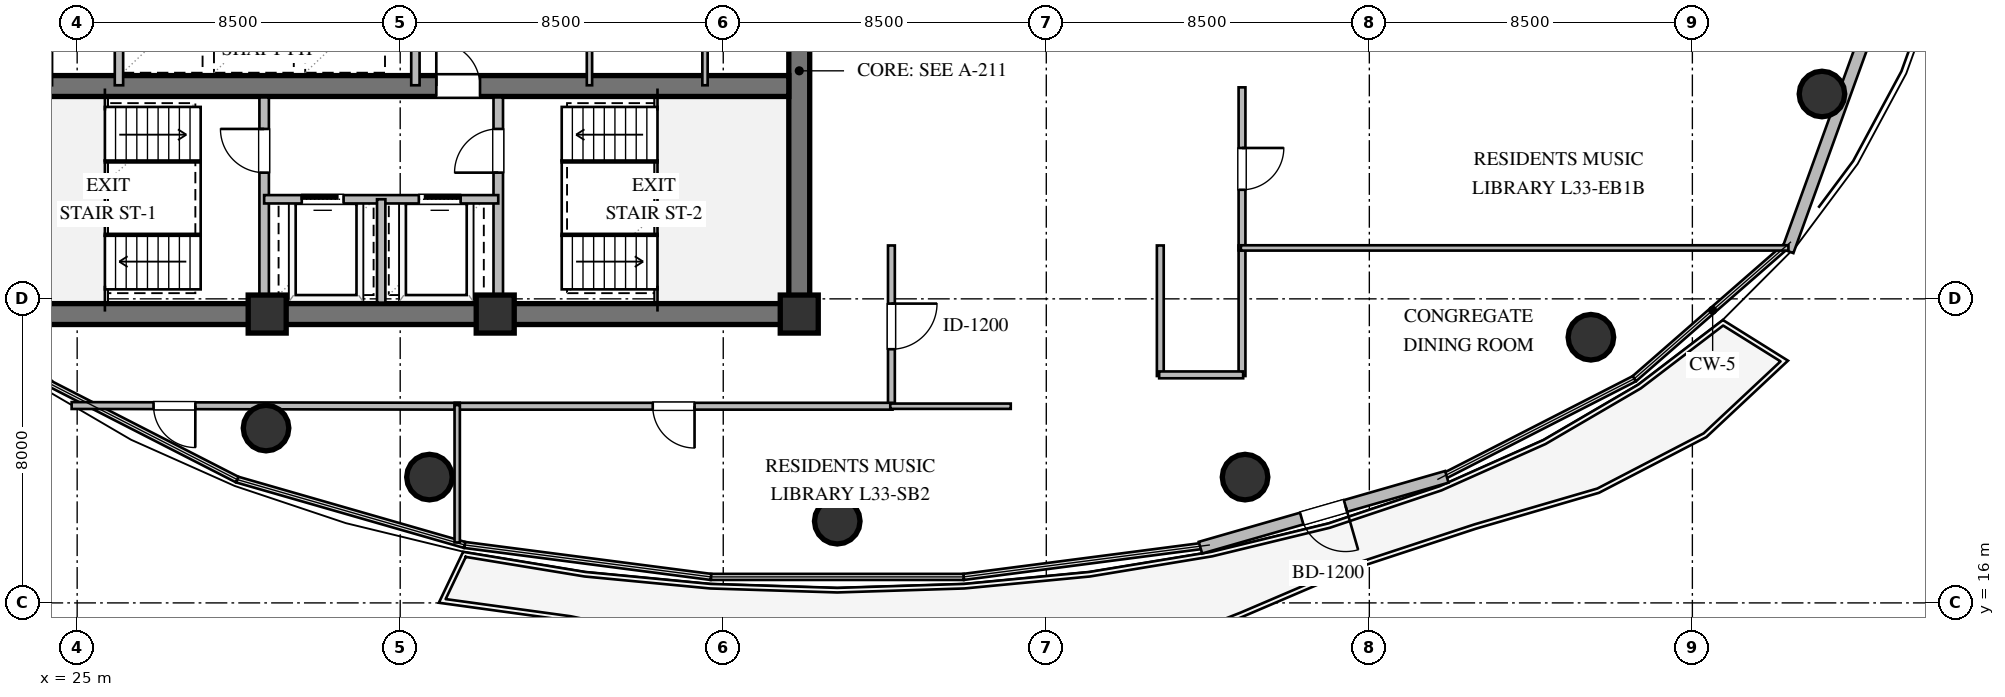
"""IFC4 building model, lengths in metres.
Left out: names, types, materials, properties, quantities, classifications, styles, units other than length and angle.
Written with IfcOpenShell. Run it as: python <this file> out.ifc"""

import sys

from ifc_helpers import new_model, si_unit, direction, frame, frame_2d, origin, origin_2d, place, context, subcontext, project, spatial, rectangle, circle, extrude, element, fill, save


model = new_model("IFC4")
c1 = context("Model", 3, precision=1e-05, world=origin(), true_north=direction((0.0, 1.0)))
c2 = subcontext(c1, "Body", "Model", "MODEL_VIEW")
j1 = project(units=[si_unit("LENGTHUNIT", "METRE"), si_unit("PLANEANGLEUNIT", "RADIAN")], contexts=[c1])
p1 = place(None, origin())
s1 = spatial("IfcSite", under=j1, at=p1, CompositionType="ELEMENT")
p2 = place(p1, origin())
s2 = spatial("IfcBuilding", under=s1, at=p2, CompositionType="ELEMENT")
p3 = place(p2, frame((0.0, 0.0, 127.8)))
s3 = spatial("IfcBuildingStorey", under=s2, at=p3, CompositionType="ELEMENT", Elevation=127.8)
p4 = place(p3, frame((21.725, 23.6, 0.0), z_axis=(0.0, 0.0, 1.0), x_axis=(1.0, 0.0, 0.0)))
e1 = element("IfcWall", 1, at=p4, inside=s3, PredefinedType="SHEAR", context=c2, shape_type="SweptSolid", body=[
    extrude(rectangle(XDim=22.55, YDim=0.55, at=frame_2d((11.275, 0.0))), origin(), (0.0, 0.0, 1.0), 3.36),
])
p5 = place(p3, frame((44.0, 23.875, 0.0), z_axis=(0.0, 0.0, 1.0), x_axis=(0.0, 1.0, 0.0)))
e2 = element("IfcWall", 2, at=p5, inside=s3, PredefinedType="SHEAR", context=c2, shape_type="SweptSolid", body=[
    extrude(rectangle(XDim=12.25, YDim=0.55, at=frame_2d((6.125, 0.0))), origin(), (0.0, 0.0, 1.0), 3.36),
])
p6 = place(p5, frame((8.725, 0.0, 0.0)))
e3 = element("IfcOpeningElement", 3, at=p6, cuts=e2, PredefinedType="OPENING", context=c2, shape_type="SweptSolid", body=[
    extrude(rectangle(XDim=1.5, YDim=2.15, at=frame_2d((0.75, 1.075))), frame((0.0, 0.285, 0.0), z_axis=(0.0, -1.0, 0.0), x_axis=(1.0, 0.0, 0.0)), (0.0, 0.0, 1.0), 0.57),
])
p7 = place(p3, frame((22.275, 29.6, 0.0), z_axis=(0.0, 0.0, 1.0), x_axis=(1.0, 0.0, 0.0)))
e4 = element("IfcWall", 4, at=p7, inside=s3, PredefinedType="SHEAR", context=c2, shape_type="SweptSolid", body=[
    extrude(rectangle(XDim=21.45, YDim=0.55, at=frame_2d((10.725, 0.0))), origin(), (0.0, 0.0, 1.0), 3.36),
])
p8 = place(p7, frame((12.175, 0.0, 0.0)))
e5 = element("IfcOpeningElement", 5, at=p8, cuts=e4, PredefinedType="OPENING", context=c2, shape_type="SweptSolid", body=[
    extrude(rectangle(XDim=1.15, YDim=2.1, at=frame_2d((0.575, 1.05))), frame((0.0, 0.285, 0.0), z_axis=(0.0, -1.0, 0.0), x_axis=(1.0, 0.0, 0.0)), (0.0, 0.0, 1.0), 0.57),
])
for number, where, z_axis, x_axis in (
    (6, (30.0, 23.6, 0.0), (0.0, 0.0, 1.0), (1.0, 0.0, 0.0)),
    (7, (36.0, 23.6, 0.0), (0.0, 0.0, 1.0), (1.0, 0.0, 0.0)),
    (8, (44.0, 23.6, 0.0), (0.0, 0.0, 1.0), (1.0, 0.0, 0.0)),
):
    element("IfcColumn", number, at=place(p3, frame(where, z_axis=z_axis, x_axis=x_axis)), inside=s3, PredefinedType="COLUMN", context=c2, shape_type="SweptSolid", body=[
        extrude(rectangle(XDim=1.0, YDim=1.0, at=origin_2d()), origin(), (0.0, 0.0, 1.0), 3.6),
    ])
for number, where, z_axis, x_axis in (
    (9, (29.97, 20.6, 0.0), (0.0, 0.0, 1.0), (1.0, 0.0, 0.0)),
    (10, (34.27, 19.31, 0.0), (0.0, 0.0, 1.0), (1.0, 0.0, 0.0)),
    (11, (45.0, 18.15, 0.0), (0.0, 0.0, 1.0), (1.0, 0.0, 0.0)),
    (12, (55.73, 19.31, 0.0), (0.0, 0.0, 1.0), (1.0, 0.0, 0.0)),
    (13, (64.83, 22.99, 0.0), (0.0, 0.0, 1.0), (1.0, 0.0, 0.0)),
    (14, (70.91, 29.39, 0.0), (0.0, 0.0, 1.0), (1.0, 0.0, 0.0)),
):
    element("IfcColumn", number, at=place(p3, frame(where, z_axis=z_axis, x_axis=x_axis)), inside=s3, PredefinedType="COLUMN", context=c2, shape_type="SweptSolid", body=[
        extrude(circle(Radius=0.6, at=origin_2d()), origin(), (0.0, 0.0, 1.0), 3.6),
    ])
p9 = place(p3, frame((74.708, 38.244, 0.0), z_axis=(0.0, 0.0, 1.0), x_axis=(-0.340324669139, -0.94030799187, 0.0)))
e15 = element("IfcWall", 15, at=p9, inside=s3, PredefinedType="STANDARD", context=c2, shape_type="SweptSolid", body=[
    extrude(rectangle(XDim=13.81, YDim=0.32, at=frame_2d((6.905, 0.0))), origin(), (0.0, 0.0, 1.0), 3.36),
])
p10 = place(p3, frame((61.039, 19.317, 0.0), z_axis=(0.0, 0.0, 1.0), x_axis=(-0.96106509915, -0.276322049784, 0.0)))
e16 = element("IfcWall", 16, at=p10, inside=s3, PredefinedType="STANDARD", context=c2, shape_type="SweptSolid", body=[
    extrude(rectangle(XDim=6.746, YDim=0.32, at=frame_2d((3.373, 0.0))), origin(), (0.0, 0.0, 1.0), 3.36),
])
p11 = place(p10, frame((2.773, 0.0, 0.0)))
e17 = element("IfcOpeningElement", 17, at=p11, cuts=e16, PredefinedType="OPENING", context=c2, shape_type="SweptSolid", body=[
    extrude(rectangle(XDim=1.2, YDim=2.15, at=frame_2d((0.6, 1.075))), frame((0.0, 0.17, 0.0), z_axis=(0.0, -1.0, 0.0), x_axis=(1.0, 0.0, 0.0)), (0.0, 0.0, 1.0), 0.34),
])
p12 = place(p3, frame((29.92, 23.9, 0.0), z_axis=(0.0, 0.0, 1.0), x_axis=(0.0, 1.0, 0.0)))
e18 = element("IfcWall", 18, at=p12, inside=s3, PredefinedType="SOLIDWALL", context=c2, shape_type="SweptSolid", body=[
    extrude(rectangle(XDim=5.4, YDim=0.25, at=frame_2d((2.7, 0.0))), origin(), (0.0, 0.0, 1.0), 2.89),
])
p13 = place(p12, frame((3.421, 0.0, 0.0)))
e19 = element("IfcOpeningElement", 19, at=p13, cuts=e18, PredefinedType="OPENING", context=c2, shape_type="SweptSolid", body=[
    extrude(rectangle(XDim=1.15, YDim=2.1, at=frame_2d((0.575, 1.05))), frame((0.0, 0.135, 0.0), z_axis=(0.0, -1.0, 0.0), x_axis=(1.0, 0.0, 0.0)), (0.0, 0.0, 1.0), 0.27),
])
p14 = place(p3, frame((36.08, 23.9, 0.0), z_axis=(0.0, 0.0, 1.0), x_axis=(0.0, 1.0, 0.0)))
e20 = element("IfcWall", 20, at=p14, inside=s3, PredefinedType="SOLIDWALL", context=c2, shape_type="SweptSolid", body=[
    extrude(rectangle(XDim=5.4, YDim=0.25, at=frame_2d((2.7, 0.0))), origin(), (0.0, 0.0, 1.0), 3.36),
])
p15 = place(p14, frame((3.421, 0.0, 0.0)))
e21 = element("IfcOpeningElement", 21, at=p15, cuts=e20, PredefinedType="OPENING", context=c2, shape_type="SweptSolid", body=[
    extrude(rectangle(XDim=1.15, YDim=2.1, at=frame_2d((0.575, 1.05))), frame((0.0, 0.135, 0.0), z_axis=(0.0, -1.0, 0.0), x_axis=(1.0, 0.0, 0.0)), (0.0, 0.0, 1.0), 0.27),
])
p16 = place(p3, frame((29.92, 26.62, 0.0), z_axis=(0.0, 0.0, 1.0), x_axis=(1.0, 0.0, 0.0)))
e22 = element("IfcWall", 22, at=p16, inside=s3, PredefinedType="SOLIDWALL", context=c2, shape_type="SweptSolid", body=[
    extrude(rectangle(XDim=6.16, YDim=0.22, at=frame_2d((3.08, 0.0))), origin(), (0.0, 0.0, 1.0), 3.36),
])
p17 = place(p16, frame((0.99, 0.0, 0.0)))
e23 = element("IfcOpeningElement", 23, at=p17, cuts=e22, PredefinedType="OPENING", context=c2, shape_type="SweptSolid", body=[
    extrude(rectangle(XDim=1.1, YDim=2.1, at=frame_2d((0.55, 1.05))), frame((0.0, 0.12, 0.0), z_axis=(0.0, -1.0, 0.0), x_axis=(1.0, 0.0, 0.0)), (0.0, 0.0, 1.0), 0.24),
])
p18 = place(p16, frame((4.07, 0.0, 0.0)))
e24 = element("IfcOpeningElement", 24, at=p18, cuts=e22, PredefinedType="OPENING", context=c2, shape_type="SweptSolid", body=[
    extrude(rectangle(XDim=1.1, YDim=2.1, at=frame_2d((0.55, 1.05))), frame((0.0, 0.12, 0.0), z_axis=(0.0, -1.0, 0.0), x_axis=(1.0, 0.0, 0.0)), (0.0, 0.0, 1.0), 0.24),
])
p19 = place(p3, frame((33.0, 23.9, 0.0), z_axis=(0.0, 0.0, 1.0), x_axis=(0.0, 1.0, 0.0)))
e25 = element("IfcWall", 25, at=p19, inside=s3, PredefinedType="SOLIDWALL", context=c2, shape_type="SweptSolid", body=[
    extrude(rectangle(XDim=2.72, YDim=0.22, at=frame_2d((1.36, 0.0))), origin(), (0.0, 0.0, 1.0), 3.36),
])
for number, where, z_axis, x_axis in (
    (26, (26.1, 29.62, 0.0), (0.0, 0.0, 1.0), (0.0, 1.0, 0.0)),
    (27, (33.9, 29.62, 0.0), (0.0, 0.0, 1.0), (0.0, 1.0, 0.0)),
):
    element("IfcWall", number, at=place(p3, frame(where, z_axis=z_axis, x_axis=x_axis)), inside=s3, PredefinedType="SOLIDWALL", context=c2, shape_type="SweptSolid", body=[
        extrude(rectangle(XDim=2.36, YDim=0.22, at=frame_2d((1.18, 0.0))), origin(), (0.0, 0.0, 1.0), 3.36),
    ])
for number, where, z_axis, x_axis in (
    (28, (38.48, 29.62, 0.0), (0.0, 0.0, 1.0), (0.0, 1.0, 0.0)),
    (29, (41.52, 29.62, 0.0), (0.0, 0.0, 1.0), (0.0, 1.0, 0.0)),
):
    element("IfcWall", number, at=place(p3, frame(where, z_axis=z_axis, x_axis=x_axis)), inside=s3, PredefinedType="PARTITIONING", context=c2, shape_type="SweptSolid", body=[
        extrude(rectangle(XDim=2.36, YDim=0.14, at=frame_2d((1.18, 0.0))), origin(), (0.0, 0.0, 1.0), 3.36),
    ])
p20 = place(p3, frame((46.425, 25.405, 0.0), z_axis=(0.0, 0.0, 1.0), x_axis=(0.0, -1.0, 0.0)))
e30 = element("IfcWall", 30, at=p20, inside=s3, PredefinedType="PARTITIONING", context=c2, shape_type="SweptSolid", body=[
    extrude(rectangle(XDim=4.26, YDim=0.18, at=frame_2d((2.13, 0.0))), origin(), (0.0, 0.0, 1.0), 3.36),
])
p21 = place(p20, frame((1.53, 0.0, 0.0)))
e31 = element("IfcOpeningElement", 31, at=p21, cuts=e30, PredefinedType="OPENING", context=c2, shape_type="SweptSolid", body=[
    extrude(rectangle(XDim=1.2, YDim=2.15, at=frame_2d((0.6, 1.075))), frame((0.0, 0.1, 0.0), z_axis=(0.0, -1.0, 0.0), x_axis=(1.0, 0.0, 0.0)), (0.0, 0.0, 1.0), 0.2),
])
for number, where, z_axis, x_axis in (
    (32, (55.65, 25.405, 0.0), (0.0, 0.0, 1.0), (0.0, -1.0, 0.0)),
    (33, (53.5, 21.97, 0.0), (0.0, 0.0, 1.0), (0.0, 1.0, 0.0)),
):
    element("IfcWall", number, at=place(p3, frame(where, z_axis=z_axis, x_axis=x_axis)), inside=s3, PredefinedType="PARTITIONING", context=c2, shape_type="SweptSolid", body=[
        extrude(rectangle(XDim=3.435, YDim=0.18, at=frame_2d((1.718, 0.0))), origin(), (0.0, 0.0, 1.0), 3.36),
    ])
p22 = place(p3, frame((55.68, 22.0, 0.0), z_axis=(0.0, 0.0, 1.0), x_axis=(-1.0, 0.0, 0.0)))
e34 = element("IfcWall", 34, at=p22, inside=s3, PredefinedType="PARTITIONING", context=c2, shape_type="SweptSolid", body=[
    extrude(rectangle(XDim=2.21, YDim=0.18, at=frame_2d((1.105, 0.0))), origin(), (0.0, 0.0, 1.0), 3.36),
])
p23 = place(p3, frame((55.65, 29.565, 0.0), z_axis=(0.0, 0.0, 1.0), x_axis=(0.0, -1.0, 0.0)))
e35 = element("IfcWall", 35, at=p23, inside=s3, PredefinedType="PARTITIONING", context=c2, shape_type="SweptSolid", body=[
    extrude(rectangle(XDim=4.29, YDim=0.18, at=frame_2d((2.145, 0.0))), origin(), (0.0, 0.0, 1.0), 3.36),
])
p24 = place(p23, frame((1.595, 0.0, 0.0)))
e36 = element("IfcOpeningElement", 36, at=p24, cuts=e35, PredefinedType="OPENING", context=c2, shape_type="SweptSolid", body=[
    extrude(rectangle(XDim=1.1, YDim=2.1, at=frame_2d((0.55, 1.05))), frame((0.0, 0.1, 0.0), z_axis=(0.0, -1.0, 0.0), x_axis=(1.0, 0.0, 0.0)), (0.0, 0.0, 1.0), 0.2),
])
p25 = place(p3, frame((35.065, 21.175, 0.0), z_axis=(0.0, 0.0, 1.0), x_axis=(-0.999998434459, 0.001769485513, 0.0)))
e37 = element("IfcWall", 37, at=p25, inside=s3, PredefinedType="PARTITIONING", context=c2, shape_type="SweptSolid", body=[
    extrude(rectangle(XDim=10.21, YDim=0.18, at=frame_2d((5.105, 0.0))), origin(), (0.0, 0.0, 1.0), 2.657),
])
p26 = place(p25, frame((6.955, 0.0, 0.0)))
e38 = element("IfcOpeningElement", 38, at=p26, cuts=e37, PredefinedType="OPENING", context=c2, shape_type="SweptSolid", body=[
    extrude(rectangle(XDim=1.1, YDim=2.1, at=frame_2d((0.55, 1.05))), frame((0.0, 0.1, 0.0), z_axis=(0.0, -1.0, 0.0), x_axis=(1.0, 0.0, 0.0)), (0.0, 0.0, 1.0), 0.2),
])
p27 = place(p3, frame((46.455, 21.175, 0.0), z_axis=(0.0, 0.0, 1.0), x_axis=(-1.0, 0.0, 0.0)))
e39 = element("IfcWall", 39, at=p27, inside=s3, PredefinedType="PARTITIONING", context=c2, shape_type="SweptSolid", body=[
    extrude(rectangle(XDim=11.52, YDim=0.18, at=frame_2d((5.76, 0.0))), origin(), (0.0, 0.0, 1.0), 2.996),
])
p28 = place(p27, frame((5.21, 0.0, 0.0)))
e40 = element("IfcOpeningElement", 40, at=p28, cuts=e39, PredefinedType="OPENING", context=c2, shape_type="SweptSolid", body=[
    extrude(rectangle(XDim=1.1, YDim=2.1, at=frame_2d((0.55, 1.05))), frame((0.0, 0.1, 0.0), z_axis=(0.0, -1.0, 0.0), x_axis=(1.0, 0.0, 0.0)), (0.0, 0.0, 1.0), 0.2),
])
p29 = place(p3, frame((55.62, 25.34, 0.0), z_axis=(0.0, 0.0, 1.0), x_axis=(1.0, 0.0, 0.0)))
e41 = element("IfcWall", 41, at=p29, inside=s3, PredefinedType="PARTITIONING", context=c2, shape_type="SweptSolid", body=[
    extrude(rectangle(XDim=14.407, YDim=0.14, at=frame_2d((7.204, 0.0))), origin(), (0.0, 0.0, 1.0), 3.36),
])
p30 = place(p3, frame((49.565, 21.175, 0.0), z_axis=(0.0, 0.0, 1.0), x_axis=(-1.0, 0.0, 0.0)))
e42 = element("IfcWall", 42, at=p30, inside=s3, PredefinedType="PARTITIONING", context=c2, shape_type="SweptSolid", body=[
    extrude(rectangle(XDim=3.17, YDim=0.14, at=frame_2d((1.585, 0.0))), origin(), (0.0, 0.0, 1.0), 2.996),
])
p31 = place(p3, frame((35.0, 21.205, 0.0), z_axis=(0.0, 0.0, 1.0), x_axis=(0.0, -1.0, 0.0)))
e43 = element("IfcWall", 43, at=p31, inside=s3, PredefinedType="PARTITIONING", context=c2, shape_type="SweptSolid", body=[
    extrude(rectangle(XDim=3.614, YDim=0.14, at=frame_2d((1.807, 0.0))), origin(), (0.0, 0.0, 1.0), 3.36),
])
p32 = place(p11, origin())
e44 = element("IfcDoor", 44, at=p32, inside=s3, OperationType="SINGLE_SWING_LEFT", PredefinedType="DOOR", context=c2, shape_type="SweptSolid", body=[
    extrude(rectangle(XDim=1.2, YDim=2.15, at=frame_2d((0.6, 1.075))), frame((0.0, 0.025, 0.0), z_axis=(0.0, -1.0, 0.0), x_axis=(1.0, 0.0, 0.0)), (0.0, 0.0, 1.0), 0.05),
])
fill(e17, e44)
p33 = place(p13, origin())
e45 = element("IfcDoor", 45, at=p33, inside=s3, OperationType="SINGLE_SWING_RIGHT", PredefinedType="DOOR", context=c2, shape_type="SweptSolid", body=[
    extrude(rectangle(XDim=1.15, YDim=2.1, at=frame_2d((0.575, 1.05))), frame((0.0, 0.025, 0.0), z_axis=(0.0, -1.0, 0.0), x_axis=(1.0, 0.0, 0.0)), (0.0, 0.0, 1.0), 0.05),
])
fill(e19, e45)
p34 = place(p15, origin())
e46 = element("IfcDoor", 46, at=p34, inside=s3, OperationType="SINGLE_SWING_LEFT", PredefinedType="DOOR", context=c2, shape_type="SweptSolid", body=[
    extrude(rectangle(XDim=1.15, YDim=2.1, at=frame_2d((0.575, 1.05))), frame((0.0, 0.025, 0.0), z_axis=(0.0, -1.0, 0.0), x_axis=(1.0, 0.0, 0.0)), (0.0, 0.0, 1.0), 0.05),
])
fill(e21, e46)
p35 = place(p17, origin())
e47 = element("IfcDoor", 47, at=p35, inside=s3, OperationType="SLIDING_TO_LEFT", PredefinedType="DOOR", context=c2, shape_type="SweptSolid", body=[
    extrude(rectangle(XDim=1.1, YDim=2.1, at=frame_2d((0.55, 1.05))), frame((0.0, 0.025, 0.0), z_axis=(0.0, -1.0, 0.0), x_axis=(1.0, 0.0, 0.0)), (0.0, 0.0, 1.0), 0.05),
])
fill(e23, e47)
p36 = place(p18, origin())
e48 = element("IfcDoor", 48, at=p36, inside=s3, OperationType="SLIDING_TO_RIGHT", PredefinedType="DOOR", context=c2, shape_type="SweptSolid", body=[
    extrude(rectangle(XDim=1.1, YDim=2.1, at=frame_2d((0.55, 1.05))), frame((0.0, 0.025, 0.0), z_axis=(0.0, -1.0, 0.0), x_axis=(1.0, 0.0, 0.0)), (0.0, 0.0, 1.0), 0.05),
])
fill(e24, e48)
p37 = place(p8, origin())
e49 = element("IfcDoor", 49, at=p37, inside=s3, OperationType="SINGLE_SWING_LEFT", PredefinedType="DOOR", context=c2, shape_type="SweptSolid", body=[
    extrude(rectangle(XDim=1.15, YDim=2.1, at=frame_2d((0.575, 1.05))), frame((0.0, 0.025, 0.0), z_axis=(0.0, -1.0, 0.0), x_axis=(1.0, 0.0, 0.0)), (0.0, 0.0, 1.0), 0.05),
])
fill(e5, e49)
p38 = place(p21, origin())
e50 = element("IfcDoor", 50, at=p38, inside=s3, OperationType="SINGLE_SWING_LEFT", PredefinedType="DOOR", context=c2, shape_type="SweptSolid", body=[
    extrude(rectangle(XDim=1.2, YDim=2.15, at=frame_2d((0.6, 1.075))), frame((0.0, 0.025, 0.0), z_axis=(0.0, -1.0, 0.0), x_axis=(1.0, 0.0, 0.0)), (0.0, 0.0, 1.0), 0.05),
])
fill(e31, e50)
p39 = place(p24, origin())
e51 = element("IfcDoor", 51, at=p39, inside=s3, OperationType="SINGLE_SWING_LEFT", PredefinedType="DOOR", context=c2, shape_type="SweptSolid", body=[
    extrude(rectangle(XDim=1.1, YDim=2.1, at=frame_2d((0.55, 1.05))), frame((0.0, 0.025, 0.0), z_axis=(0.0, -1.0, 0.0), x_axis=(1.0, 0.0, 0.0)), (0.0, 0.0, 1.0), 0.05),
])
fill(e36, e51)
p40 = place(p26, origin())
e52 = element("IfcDoor", 52, at=p40, inside=s3, OperationType="SINGLE_SWING_LEFT", PredefinedType="DOOR", context=c2, shape_type="SweptSolid", body=[
    extrude(rectangle(XDim=1.1, YDim=2.1, at=frame_2d((0.55, 1.05))), frame((0.0, 0.025, 0.0), z_axis=(0.0, -1.0, 0.0), x_axis=(1.0, 0.0, 0.0)), (0.0, 0.0, 1.0), 0.05),
])
fill(e38, e52)
p41 = place(p28, origin())
e53 = element("IfcDoor", 53, at=p41, inside=s3, OperationType="SINGLE_SWING_LEFT", PredefinedType="DOOR", context=c2, shape_type="SweptSolid", body=[
    extrude(rectangle(XDim=1.1, YDim=2.1, at=frame_2d((0.55, 1.05))), frame((0.0, 0.025, 0.0), z_axis=(0.0, -1.0, 0.0), x_axis=(1.0, 0.0, 0.0)), (0.0, 0.0, 1.0), 0.05),
])
fill(e40, e53)
save(model, sys.argv[1])
